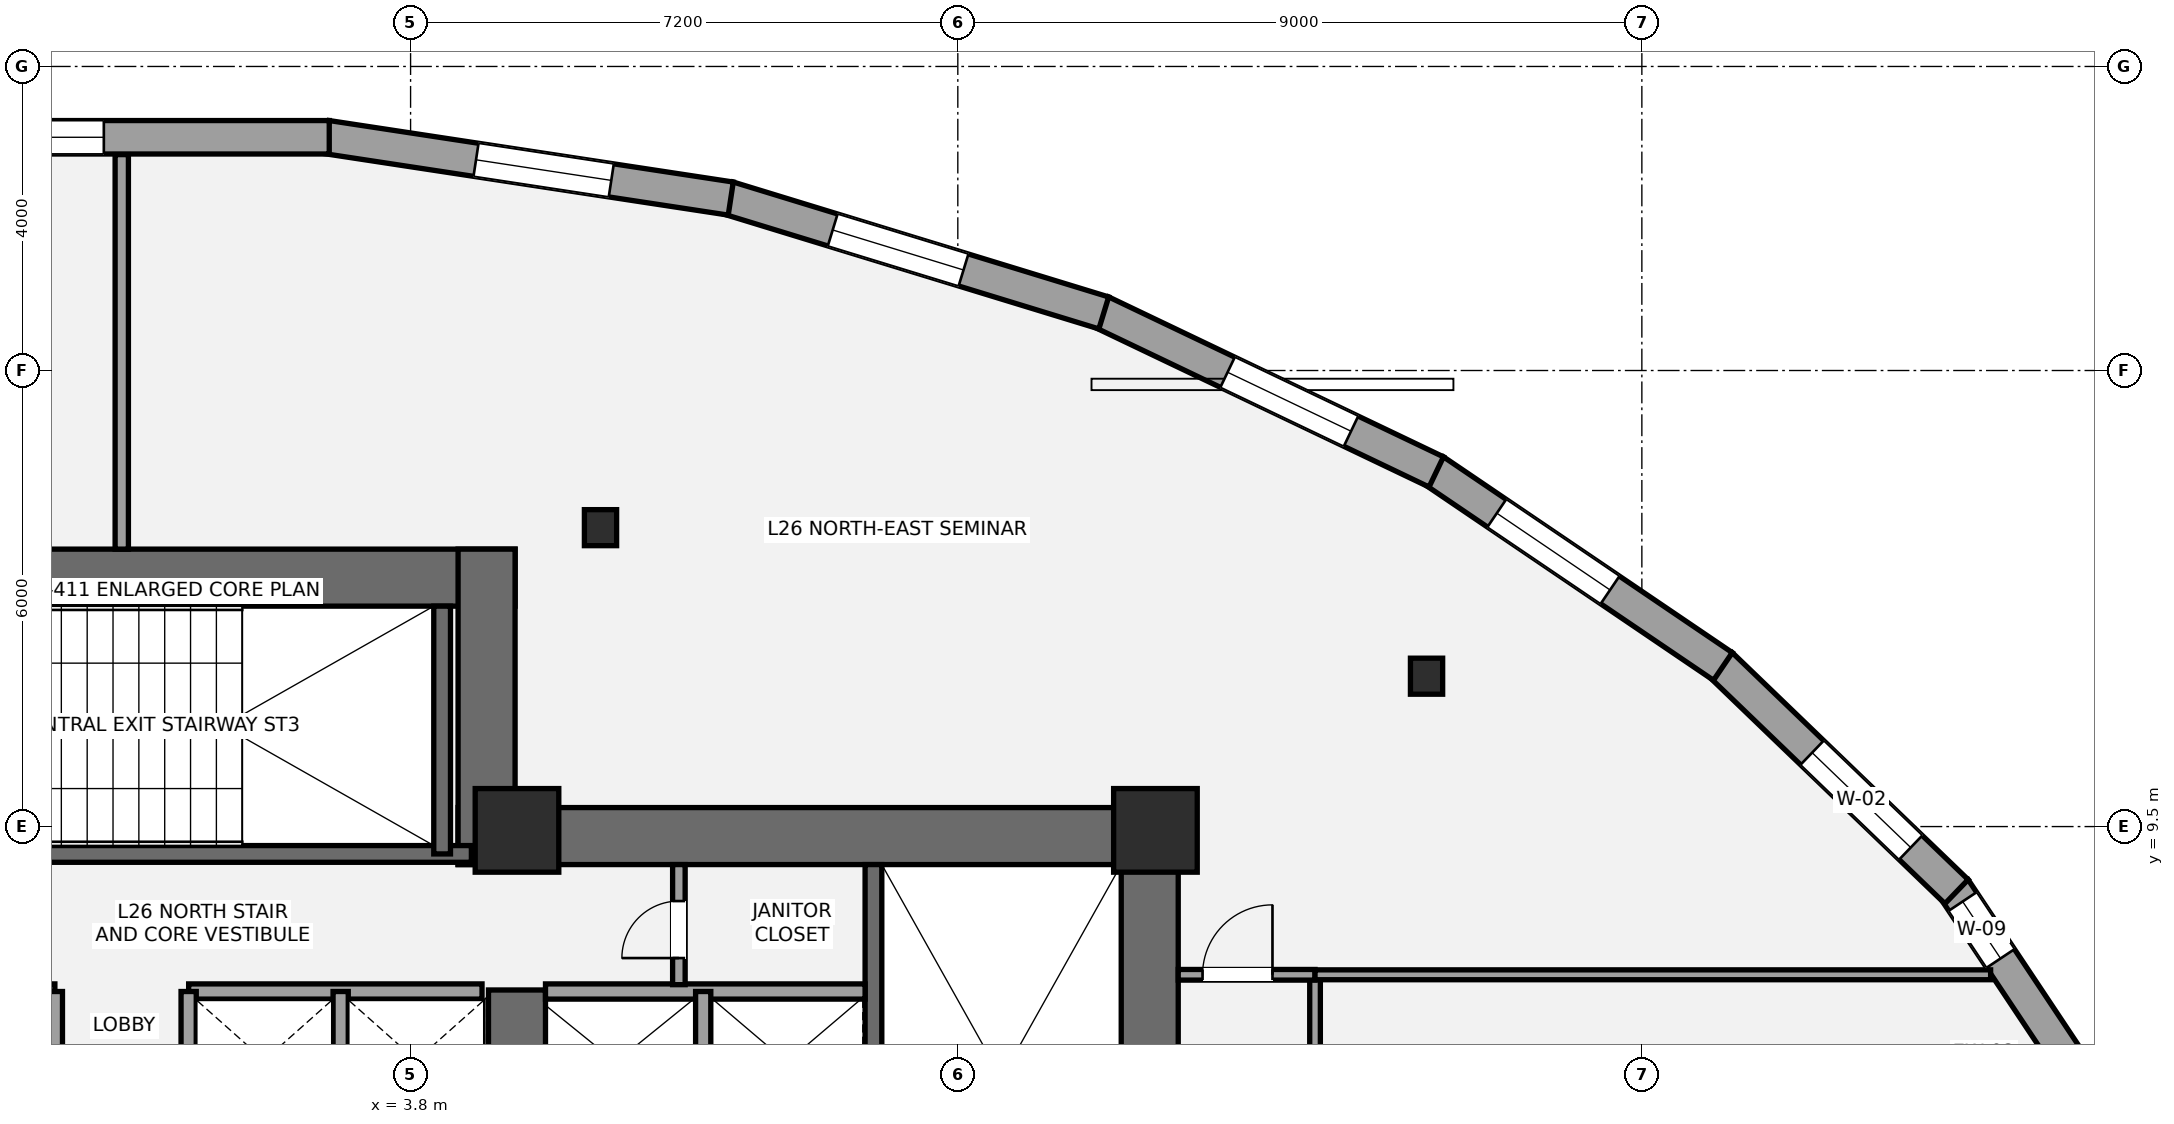
"""IFC4 building model, lengths in metres.
Left out: names, types, materials, properties, quantities, classifications, styles, units other than length and angle.
Written with IfcOpenShell. Run it as: python <this file> out.ifc"""

import sys

from ifc_helpers import new_model, si_unit, direction, frame, frame_2d, origin, origin_2d, place, context, subcontext, project, spatial, rectangle, i_section, extrude, element, fill, save


model = new_model("IFC4")
c1 = context("Model", 3, precision=1e-05, world=origin(), true_north=direction((0.0, 1.0)))
c2 = subcontext(c1, "Body", "Model", "MODEL_VIEW")
j1 = project(units=[si_unit("LENGTHUNIT", "METRE"), si_unit("PLANEANGLEUNIT", "RADIAN")], contexts=[c1])
p1 = place(None, origin())
s1 = spatial("IfcSite", under=j1, at=p1, CompositionType="ELEMENT")
p2 = place(p1, origin())
s2 = spatial("IfcBuilding", under=s1, at=p2, CompositionType="ELEMENT")
p3 = place(p2, frame((0.0, 0.0, 100.1)))
s3 = spatial("IfcBuildingStorey", under=s2, at=p3, CompositionType="ELEMENT", Elevation=100.1)
p4 = place(p3, frame((13.525, 1.1, 0.0), z_axis=(0.0, 0.0, 1.0), x_axis=(0.0, 1.0, 0.0)))
e1 = element("IfcWall", 1, at=p4, inside=s3, PredefinedType="SHEAR", context=c2, shape_type="SweptSolid", body=[
    extrude(rectangle(XDim=8.65, YDim=0.75, at=frame_2d((4.325, 0.0))), origin(), (0.0, 0.0, 1.0), 3.5),
])
p5 = place(p3, frame((4.425, 9.375, 0.0), z_axis=(0.0, 0.0, 1.0), x_axis=(1.0, 0.0, 0.0)))
e2 = element("IfcWall", 2, at=p5, inside=s3, PredefinedType="SHEAR", context=c2, shape_type="SweptSolid", body=[
    extrude(rectangle(XDim=9.475, YDim=0.75, at=frame_2d((4.737, 0.0))), origin(), (0.0, 0.0, 1.0), 3.5),
])
p6 = place(p3, frame((5.2, 5.35, 0.0), z_axis=(0.0, 0.0, 1.0), x_axis=(0.0, 1.0, 0.0)))
e3 = element("IfcWall", 3, at=p6, inside=s3, PredefinedType="SHEAR", context=c2, shape_type="SweptSolid", body=[
    extrude(rectangle(XDim=2.0, YDim=0.75, at=frame_2d((1.0, 0.0))), origin(), (0.0, 0.0, 1.0), 3.5),
])
p7 = place(p3, frame((9.89, 1.85, 0.0), z_axis=(0.0, 0.0, 1.0), x_axis=(0.0, 1.0, 0.0)))
e4 = element("IfcWall", 4, at=p7, inside=s3, PredefinedType="SHEAR", context=c2, shape_type="SweptSolid", body=[
    extrude(rectangle(XDim=7.15, YDim=0.22, at=frame_2d((3.575, 0.0))), origin(), (0.0, 0.0, 1.0), 3.5),
])
p8 = place(p3, frame((-5.175, 12.775, 0.0), z_axis=(0.0, 0.0, 1.0), x_axis=(1.0, 0.0, 0.0)))
e5 = element("IfcWall", 5, at=p8, inside=s3, PredefinedType="SHEAR", context=c2, shape_type="SweptSolid", body=[
    extrude(rectangle(XDim=10.35, YDim=0.75, at=frame_2d((5.175, 0.0))), origin(), (0.0, 0.0, 1.0), 3.5),
])
p9 = place(p3, frame((4.8, 9.0, 0.0), z_axis=(0.0, 0.0, 1.0), x_axis=(0.0, 1.0, 0.0)))
e6 = element("IfcWall", 6, at=p9, inside=s3, PredefinedType="SHEAR", context=c2, shape_type="SweptSolid", body=[
    extrude(rectangle(XDim=4.15, YDim=0.75, at=frame_2d((2.075, 0.0))), origin(), (0.0, 0.0, 1.0), 3.5),
])
p10 = place(p3, frame((-4.7, 9.14, 0.0), z_axis=(0.0, 0.0, 1.0), x_axis=(1.0, 0.0, 0.0)))
e7 = element("IfcWall", 7, at=p10, inside=s3, PredefinedType="SHEAR", context=c2, shape_type="SweptSolid", body=[
    extrude(rectangle(XDim=9.3, YDim=0.22, at=frame_2d((4.65, 0.0))), origin(), (0.0, 0.0, 1.0), 3.5),
])
p11 = place(p10, frame((1.15, 0.0, 0.0)))
e8 = element("IfcOpeningElement", 8, at=p11, cuts=e7, PredefinedType="OPENING", context=c2, shape_type="SweptSolid", body=[
    extrude(rectangle(XDim=1.05, YDim=2.15, at=frame_2d((0.525, 1.075))), frame((0.0, 0.12, 0.0), z_axis=(0.0, -1.0, 0.0), x_axis=(1.0, 0.0, 0.0)), (0.0, 0.0, 1.0), 0.24),
])
p12 = place(p3, frame((4.215, 9.14, 0.0), z_axis=(0.0, 0.0, 1.0), x_axis=(0.0, 1.0, 0.0)))
e9 = element("IfcWall", 9, at=p12, inside=s3, PredefinedType="SHEAR", context=c2, shape_type="SweptSolid", body=[
    extrude(rectangle(XDim=3.26, YDim=0.22, at=frame_2d((1.63, 0.0))), origin(), (0.0, 0.0, 1.0), 3.5),
])
for number, where, z_axis, x_axis in (
    (10, (5.2, 9.45, 0.0), (0.0, 0.0, 1.0), (1.0, 0.0, 0.0)),
    (11, (13.6, 9.45, 0.0), (0.0, 0.0, 1.0), (1.0, 0.0, 0.0)),
):
    element("IfcColumn", number, at=place(p3, frame(where, z_axis=z_axis, x_axis=x_axis)), inside=s3, PredefinedType="COLUMN", context=c2, shape_type="SweptSolid", body=[
        extrude(rectangle(XDim=1.1, YDim=1.1, at=origin_2d()), origin(), (0.0, 0.0, 1.0), 3.5),
    ])
for number, where, z_axis, x_axis in (
    (12, (17.167, 11.478, 0.0), (0.0, 0.0, 1.0), (1.0, 0.0, 0.0)),
    (13, (6.299, 13.433, 0.0), (0.0, 0.0, 1.0), (1.0, 0.0, 0.0)),
):
    element("IfcColumn", number, at=place(p3, frame(where, z_axis=z_axis, x_axis=x_axis)), inside=s3, PredefinedType="COLUMN", context=c2, shape_type="SweptSolid", body=[
        extrude(i_section(OverallWidth=0.424, OverallDepth=0.474, WebThickness=0.048, FlangeThickness=0.077, at=origin_2d()), origin(), (0.0, 0.0, 1.0), 3.5),
    ])
p13 = place(p3, frame((24.11, 8.68, 0.0), z_axis=(0.0, 0.0, 1.0), x_axis=(0.554293965046, -0.83232097193, 0.0)))
e14 = element("IfcWall", 14, at=p13, inside=s3, PredefinedType="STANDARD", context=c2, shape_type="SweptSolid", body=[
    extrude(rectangle(XDim=4.023, YDim=0.44, at=frame_2d((2.011, 0.0))), origin(), (0.0, 0.0, 1.0), 2.528),
])
p14 = place(p13, frame((0.2, 0.0, 0.58)))
e15 = element("IfcOpeningElement", 15, at=p14, cuts=e14, PredefinedType="OPENING", context=c2, shape_type="SweptSolid", body=[
    extrude(rectangle(XDim=0.9, YDim=1.35, at=frame_2d((0.45, 0.675))), frame((0.0, 0.23, 0.0), z_axis=(0.0, -1.0, 0.0), x_axis=(1.0, 0.0, 0.0)), (0.0, 0.0, 1.0), 0.46),
])
p15 = place(p3, frame((21.037, 11.63, 0.0), z_axis=(0.0, 0.0, 1.0), x_axis=(0.720581378362, -0.693370375166, 0.0)))
e16 = element("IfcWall", 16, at=p15, inside=s3, PredefinedType="STANDARD", context=c2, shape_type="SweptSolid", body=[
    extrude(rectangle(XDim=4.307, YDim=0.44, at=frame_2d((2.153, 0.0))), origin(), (0.0, 0.0, 1.0), 2.528),
])
p16 = place(p15, frame((1.67, 0.0, 0.65)))
e17 = element("IfcOpeningElement", 17, at=p16, cuts=e16, PredefinedType="OPENING", context=c2, shape_type="SweptSolid", body=[
    extrude(rectangle(XDim=1.8, YDim=1.7, at=frame_2d((0.9, 0.85))), frame((0.0, 0.23, 0.0), z_axis=(0.0, -1.0, 0.0), x_axis=(1.0, 0.0, 0.0)), (0.0, 0.0, 1.0), 0.46),
])
p17 = place(p3, frame((17.266, 14.182, 0.0), z_axis=(0.0, 0.0, 1.0), x_axis=(0.827754551165, -0.56109036975, 0.0)))
e18 = element("IfcWall", 18, at=p17, inside=s3, PredefinedType="STANDARD", context=c2, shape_type="SweptSolid", body=[
    extrude(rectangle(XDim=4.591, YDim=0.44, at=frame_2d((2.295, 0.0))), origin(), (0.0, 0.0, 1.0), 2.528),
])
p18 = place(p17, frame((0.997, 0.0, 0.65)))
e19 = element("IfcOpeningElement", 19, at=p18, cuts=e18, PredefinedType="OPENING", context=c2, shape_type="SweptSolid", body=[
    extrude(rectangle(XDim=1.8, YDim=1.7, at=frame_2d((0.9, 0.85))), frame((0.0, 0.23, 0.0), z_axis=(0.0, -1.0, 0.0), x_axis=(1.0, 0.0, 0.0)), (0.0, 0.0, 1.0), 0.46),
])
p19 = place(p3, frame((12.89, 16.27, 0.0), z_axis=(0.0, 0.0, 1.0), x_axis=(0.902372757907, -0.430956385018, 0.0)))
e20 = element("IfcWall", 20, at=p19, inside=s3, PredefinedType="STANDARD", context=c2, shape_type="SweptSolid", body=[
    extrude(rectangle(XDim=4.882, YDim=0.44, at=frame_2d((2.441, 0.0))), origin(), (0.0, 0.0, 1.0), 2.528),
])
p20 = place(p19, frame((1.839, 0.0, 0.65)))
e21 = element("IfcOpeningElement", 21, at=p20, cuts=e20, PredefinedType="OPENING", context=c2, shape_type="SweptSolid", body=[
    extrude(rectangle(XDim=1.8, YDim=1.7, at=frame_2d((0.9, 0.85))), frame((0.0, 0.23, 0.0), z_axis=(0.0, -1.0, 0.0), x_axis=(1.0, 0.0, 0.0)), (0.0, 0.0, 1.0), 0.46),
])
p21 = place(p3, frame((7.981, 17.769, 0.0), z_axis=(0.0, 0.0, 1.0), x_axis=(0.956228569431, -0.292620783617, 0.0)))
e22 = element("IfcWall", 22, at=p21, inside=s3, PredefinedType="STANDARD", context=c2, shape_type="SweptSolid", body=[
    extrude(rectangle(XDim=5.165, YDim=0.44, at=frame_2d((2.583, 0.0))), origin(), (0.0, 0.0, 1.0), 2.528),
])
p22 = place(p21, frame((1.436, 0.0, 0.65)))
e23 = element("IfcOpeningElement", 23, at=p22, cuts=e22, PredefinedType="OPENING", context=c2, shape_type="SweptSolid", body=[
    extrude(rectangle(XDim=1.8, YDim=1.7, at=frame_2d((0.9, 0.85))), frame((0.0, 0.23, 0.0), z_axis=(0.0, -1.0, 0.0), x_axis=(1.0, 0.0, 0.0)), (0.0, 0.0, 1.0), 0.46),
])
p23 = place(p3, frame((2.697, 18.571, 0.0), z_axis=(0.0, 0.0, 1.0), x_axis=(0.988627497469, -0.150385076545, 0.0)))
e24 = element("IfcWall", 24, at=p23, inside=s3, PredefinedType="STANDARD", context=c2, shape_type="SweptSolid", body=[
    extrude(rectangle(XDim=5.377, YDim=0.44, at=frame_2d((2.688, 0.0))), origin(), (0.0, 0.0, 1.0), 2.528),
])
p24 = place(p23, frame((1.987, 0.0, 0.65)))
e25 = element("IfcOpeningElement", 25, at=p24, cuts=e24, PredefinedType="OPENING", context=c2, shape_type="SweptSolid", body=[
    extrude(rectangle(XDim=1.8, YDim=1.7, at=frame_2d((0.9, 0.85))), frame((0.0, 0.23, 0.0), z_axis=(0.0, -1.0, 0.0), x_axis=(1.0, 0.0, 0.0)), (0.0, 0.0, 1.0), 0.46),
])
p25 = place(p3, frame((-2.73, 18.568, 0.0), z_axis=(0.0, 0.0, 1.0), x_axis=(1.0, 0.0, 0.0)))
e26 = element("IfcWall", 26, at=p25, inside=s3, PredefinedType="STANDARD", context=c2, shape_type="SweptSolid", body=[
    extrude(rectangle(XDim=5.459, YDim=0.44, at=frame_2d((2.73, 0.0))), origin(), (0.0, 0.0, 1.0), 2.528),
])
p26 = place(p25, frame((0.694, 0.0, 0.65)))
e27 = element("IfcOpeningElement", 27, at=p26, cuts=e26, PredefinedType="OPENING", context=c2, shape_type="SweptSolid", body=[
    extrude(rectangle(XDim=1.8, YDim=1.7, at=frame_2d((0.9, 0.85))), frame((0.0, 0.23, 0.0), z_axis=(0.0, -1.0, 0.0), x_axis=(1.0, 0.0, 0.0)), (0.0, 0.0, 1.0), 0.46),
])
p27 = place(p3, frame((5.575, 7.33, 0.0), z_axis=(0.0, 0.0, 1.0), x_axis=(1.0, 0.0, 0.0)))
e28 = element("IfcWall", 28, at=p27, inside=s3, PredefinedType="SOLIDWALL", context=c2, shape_type="SweptSolid", body=[
    extrude(rectangle(XDim=4.205, YDim=0.2, at=frame_2d((2.103, 0.0))), origin(), (0.0, 0.0, 1.0), 3.31),
])
p28 = place(p3, frame((7.65, 5.47, 0.0), z_axis=(0.0, 0.0, 1.0), x_axis=(0.0, 1.0, 0.0)))
e29 = element("IfcWall", 29, at=p28, inside=s3, PredefinedType="SOLIDWALL", context=c2, shape_type="SweptSolid", body=[
    extrude(rectangle(XDim=1.86, YDim=0.2, at=frame_2d((0.93, 0.0))), origin(), (0.0, 0.0, 1.0), 3.31),
])
for number, where, z_axis, x_axis in (
    (30, (-4.74, 7.33, 0.0), (0.0, 0.0, 1.0), (1.0, 0.0, 0.0)),
    (31, (0.88, 7.33, 0.0), (0.0, 0.0, 1.0), (1.0, 0.0, 0.0)),
):
    element("IfcWall", number, at=place(p3, frame(where, z_axis=z_axis, x_axis=x_axis)), inside=s3, PredefinedType="SOLIDWALL", context=c2, shape_type="SweptSolid", body=[
        extrude(rectangle(XDim=3.86, YDim=0.2, at=frame_2d((1.93, 0.0))), origin(), (0.0, 0.0, 1.0), 3.31),
    ])
for number, where, z_axis, x_axis in (
    (32, (2.88, 5.52, 0.0), (0.0, 0.0, 1.0), (0.0, 1.0, 0.0)),
    (33, (-0.88, 5.52, 0.0), (0.0, 0.0, 1.0), (0.0, 1.0, 0.0)),
    (34, (0.88, 5.52, 0.0), (0.0, 0.0, 1.0), (0.0, 1.0, 0.0)),
):
    element("IfcWall", number, at=place(p3, frame(where, z_axis=z_axis, x_axis=x_axis)), inside=s3, PredefinedType="SOLIDWALL", context=c2, shape_type="SweptSolid", body=[
        extrude(rectangle(XDim=1.81, YDim=0.2, at=frame_2d((0.905, 0.0))), origin(), (0.0, 0.0, 1.0), 3.31),
    ])
p29 = place(p3, frame((7.33, 7.42, 0.0), z_axis=(0.0, 0.0, 1.0), x_axis=(0.0, 1.0, 0.0)))
e35 = element("IfcWall", 35, at=p29, inside=s3, PredefinedType="PARTITIONING", context=c2, shape_type="SweptSolid", body=[
    extrude(rectangle(XDim=1.58, YDim=0.165, at=frame_2d((0.79, 0.0))), origin(), (0.0, 0.0, 1.0), 3.31),
])
p30 = place(p29, frame((0.35, 0.0, 0.0)))
e36 = element("IfcOpeningElement", 36, at=p30, cuts=e35, PredefinedType="OPENING", context=c2, shape_type="SweptSolid", body=[
    extrude(rectangle(XDim=0.75, YDim=2.1, at=frame_2d((0.375, 1.05))), frame((0.0, 0.093, 0.0), z_axis=(0.0, -1.0, 0.0), x_axis=(1.0, 0.0, 0.0)), (0.0, 0.0, 1.0), 0.185),
])
p31 = place(p3, frame((15.7, -14.675, 0.0), z_axis=(0.0, 0.0, 1.0), x_axis=(0.0, 1.0, 0.0)))
e37 = element("IfcWall", 37, at=p31, inside=s3, PredefinedType="PARTITIONING", context=c2, shape_type="SweptSolid", body=[
    extrude(rectangle(XDim=22.225, YDim=0.14, at=frame_2d((11.112, 0.0))), origin(), (0.0, 0.0, 1.0), 2.763),
])
p32 = place(p31, frame((9.325, 0.0, 0.0)))
e38 = element("IfcOpeningElement", 38, at=p32, cuts=e37, PredefinedType="OPENING", context=c2, shape_type="SweptSolid", body=[
    extrude(rectangle(XDim=0.9, YDim=2.1, at=frame_2d((0.45, 1.05))), frame((0.0, 0.08, 0.0), z_axis=(0.0, -1.0, 0.0), x_axis=(1.0, 0.0, 0.0)), (0.0, 0.0, 1.0), 0.16),
])
p33 = place(p31, frame((13.525, 0.0, 0.0)))
e39 = element("IfcOpeningElement", 39, at=p33, cuts=e37, PredefinedType="OPENING", context=c2, shape_type="SweptSolid", body=[
    extrude(rectangle(XDim=0.9, YDim=2.1, at=frame_2d((0.45, 1.05))), frame((0.0, 0.08, 0.0), z_axis=(0.0, -1.0, 0.0), x_axis=(1.0, 0.0, 0.0)), (0.0, 0.0, 1.0), 0.16),
])
p34 = place(p31, frame((16.925, 0.0, 0.0)))
e40 = element("IfcOpeningElement", 40, at=p34, cuts=e37, PredefinedType="OPENING", context=c2, shape_type="SweptSolid", body=[
    extrude(rectangle(XDim=0.9, YDim=2.1, at=frame_2d((0.45, 1.05))), frame((0.0, 0.08, 0.0), z_axis=(0.0, -1.0, 0.0), x_axis=(1.0, 0.0, 0.0)), (0.0, 0.0, 1.0), 0.16),
])
p35 = place(p31, frame((20.2, 0.0, 0.0)))
e41 = element("IfcOpeningElement", 41, at=p35, cuts=e37, PredefinedType="OPENING", context=c2, shape_type="SweptSolid", body=[
    extrude(rectangle(XDim=0.9, YDim=2.1, at=frame_2d((0.45, 1.05))), frame((0.0, 0.08, 0.0), z_axis=(0.0, -1.0, 0.0), x_axis=(1.0, 0.0, 0.0)), (0.0, 0.0, 1.0), 0.16),
])
p36 = place(p3, frame((13.9, 7.55, 0.0), z_axis=(0.0, 0.0, 1.0), x_axis=(1.0, 0.0, 0.0)))
e42 = element("IfcWall", 42, at=p36, inside=s3, PredefinedType="PARTITIONING", context=c2, shape_type="SweptSolid", body=[
    extrude(rectangle(XDim=1.8, YDim=0.14, at=frame_2d((0.9, 0.0))), origin(), (0.0, 0.0, 1.0), 2.763),
])
p37 = place(p36, frame((0.32, 0.0, 0.0)))
e43 = element("IfcOpeningElement", 43, at=p37, cuts=e42, PredefinedType="OPENING", context=c2, shape_type="SweptSolid", body=[
    extrude(rectangle(XDim=0.92, YDim=2.15, at=frame_2d((0.46, 1.075))), frame((0.0, 0.08, 0.0), z_axis=(0.0, -1.0, 0.0), x_axis=(1.0, 0.0, 0.0)), (0.0, 0.0, 1.0), 0.16),
])
p38 = place(p3, frame((0.0, 13.15, 0.0), z_axis=(0.0, 0.0, 1.0), x_axis=(0.0, 1.0, 0.0)))
e44 = element("IfcWall", 44, at=p38, inside=s3, PredefinedType="PARTITIONING", context=c2, shape_type="SweptSolid", body=[
    extrude(rectangle(XDim=5.19, YDim=0.175, at=frame_2d((2.595, 0.0))), origin(), (0.0, 0.0, 1.0), 3.31),
])
p39 = place(p3, frame((15.7, 7.55, 0.0), z_axis=(0.0, 0.0, 1.0), x_axis=(1.0, 0.0, 0.0)))
e45 = element("IfcWall", 45, at=p39, inside=s3, PredefinedType="PARTITIONING", context=c2, shape_type="SweptSolid", body=[
    extrude(rectangle(XDim=8.889, YDim=0.13, at=frame_2d((4.444, 0.0))), origin(), (0.0, 0.0, 1.0), 2.763),
])
p40 = place(p14, origin())
e46 = element("IfcWindow", 46, at=p40, inside=s3, PartitioningType="SINGLE_PANEL", PredefinedType="WINDOW", context=c2, shape_type="SweptSolid", body=[
    extrude(rectangle(XDim=0.9, YDim=1.35, at=frame_2d((0.45, 0.675))), frame((0.0, -0.01, 0.0), z_axis=(0.0, -1.0, 0.0), x_axis=(1.0, 0.0, 0.0)), (0.0, 0.0, 1.0), 0.06),
])
fill(e15, e46)
p41 = place(p16, origin())
e47 = element("IfcWindow", 47, at=p41, inside=s3, PartitioningType="SINGLE_PANEL", PredefinedType="WINDOW", context=c2, shape_type="SweptSolid", body=[
    extrude(rectangle(XDim=1.8, YDim=1.7, at=frame_2d((0.9, 0.85))), frame((0.0, -0.01, 0.0), z_axis=(0.0, -1.0, 0.0), x_axis=(1.0, 0.0, 0.0)), (0.0, 0.0, 1.0), 0.06),
])
fill(e17, e47)
p42 = place(p18, origin())
e48 = element("IfcWindow", 48, at=p42, inside=s3, PartitioningType="SINGLE_PANEL", PredefinedType="WINDOW", context=c2, shape_type="SweptSolid", body=[
    extrude(rectangle(XDim=1.8, YDim=1.7, at=frame_2d((0.9, 0.85))), frame((0.0, -0.01, 0.0), z_axis=(0.0, -1.0, 0.0), x_axis=(1.0, 0.0, 0.0)), (0.0, 0.0, 1.0), 0.06),
])
fill(e19, e48)
p43 = place(p20, origin())
e49 = element("IfcWindow", 49, at=p43, inside=s3, PartitioningType="SINGLE_PANEL", PredefinedType="WINDOW", context=c2, shape_type="SweptSolid", body=[
    extrude(rectangle(XDim=1.8, YDim=1.7, at=frame_2d((0.9, 0.85))), frame((0.0, -0.01, 0.0), z_axis=(0.0, -1.0, 0.0), x_axis=(1.0, 0.0, 0.0)), (0.0, 0.0, 1.0), 0.06),
])
fill(e21, e49)
p44 = place(p22, origin())
e50 = element("IfcWindow", 50, at=p44, inside=s3, PartitioningType="SINGLE_PANEL", PredefinedType="WINDOW", context=c2, shape_type="SweptSolid", body=[
    extrude(rectangle(XDim=1.8, YDim=1.7, at=frame_2d((0.9, 0.85))), frame((0.0, -0.01, 0.0), z_axis=(0.0, -1.0, 0.0), x_axis=(1.0, 0.0, 0.0)), (0.0, 0.0, 1.0), 0.06),
])
fill(e23, e50)
p45 = place(p24, origin())
e51 = element("IfcWindow", 51, at=p45, inside=s3, PartitioningType="SINGLE_PANEL", PredefinedType="WINDOW", context=c2, shape_type="SweptSolid", body=[
    extrude(rectangle(XDim=1.8, YDim=1.7, at=frame_2d((0.9, 0.85))), frame((0.0, -0.01, 0.0), z_axis=(0.0, -1.0, 0.0), x_axis=(1.0, 0.0, 0.0)), (0.0, 0.0, 1.0), 0.06),
])
fill(e25, e51)
p46 = place(p26, origin())
e52 = element("IfcWindow", 52, at=p46, inside=s3, PartitioningType="SINGLE_PANEL", PredefinedType="WINDOW", context=c2, shape_type="SweptSolid", body=[
    extrude(rectangle(XDim=1.8, YDim=1.7, at=frame_2d((0.9, 0.85))), frame((0.0, -0.01, 0.0), z_axis=(0.0, -1.0, 0.0), x_axis=(1.0, 0.0, 0.0)), (0.0, 0.0, 1.0), 0.06),
])
fill(e27, e52)
p47 = place(p30, origin())
e53 = element("IfcDoor", 53, at=p47, inside=s3, OperationType="SINGLE_SWING_LEFT", PredefinedType="DOOR", context=c2, shape_type="SweptSolid", body=[
    extrude(rectangle(XDim=0.75, YDim=2.1, at=frame_2d((0.375, 1.05))), frame((0.0, 0.025, 0.0), z_axis=(0.0, -1.0, 0.0), x_axis=(1.0, 0.0, 0.0)), (0.0, 0.0, 1.0), 0.05),
])
fill(e36, e53)
p48 = place(p37, origin())
e54 = element("IfcDoor", 54, at=p48, inside=s3, OperationType="SINGLE_SWING_RIGHT", PredefinedType="DOOR", context=c2, shape_type="SweptSolid", body=[
    extrude(rectangle(XDim=0.92, YDim=2.15, at=frame_2d((0.46, 1.075))), frame((0.0, 0.025, 0.0), z_axis=(0.0, -1.0, 0.0), x_axis=(1.0, 0.0, 0.0)), (0.0, 0.0, 1.0), 0.05),
])
fill(e43, e54)
save(model, sys.argv[1])
